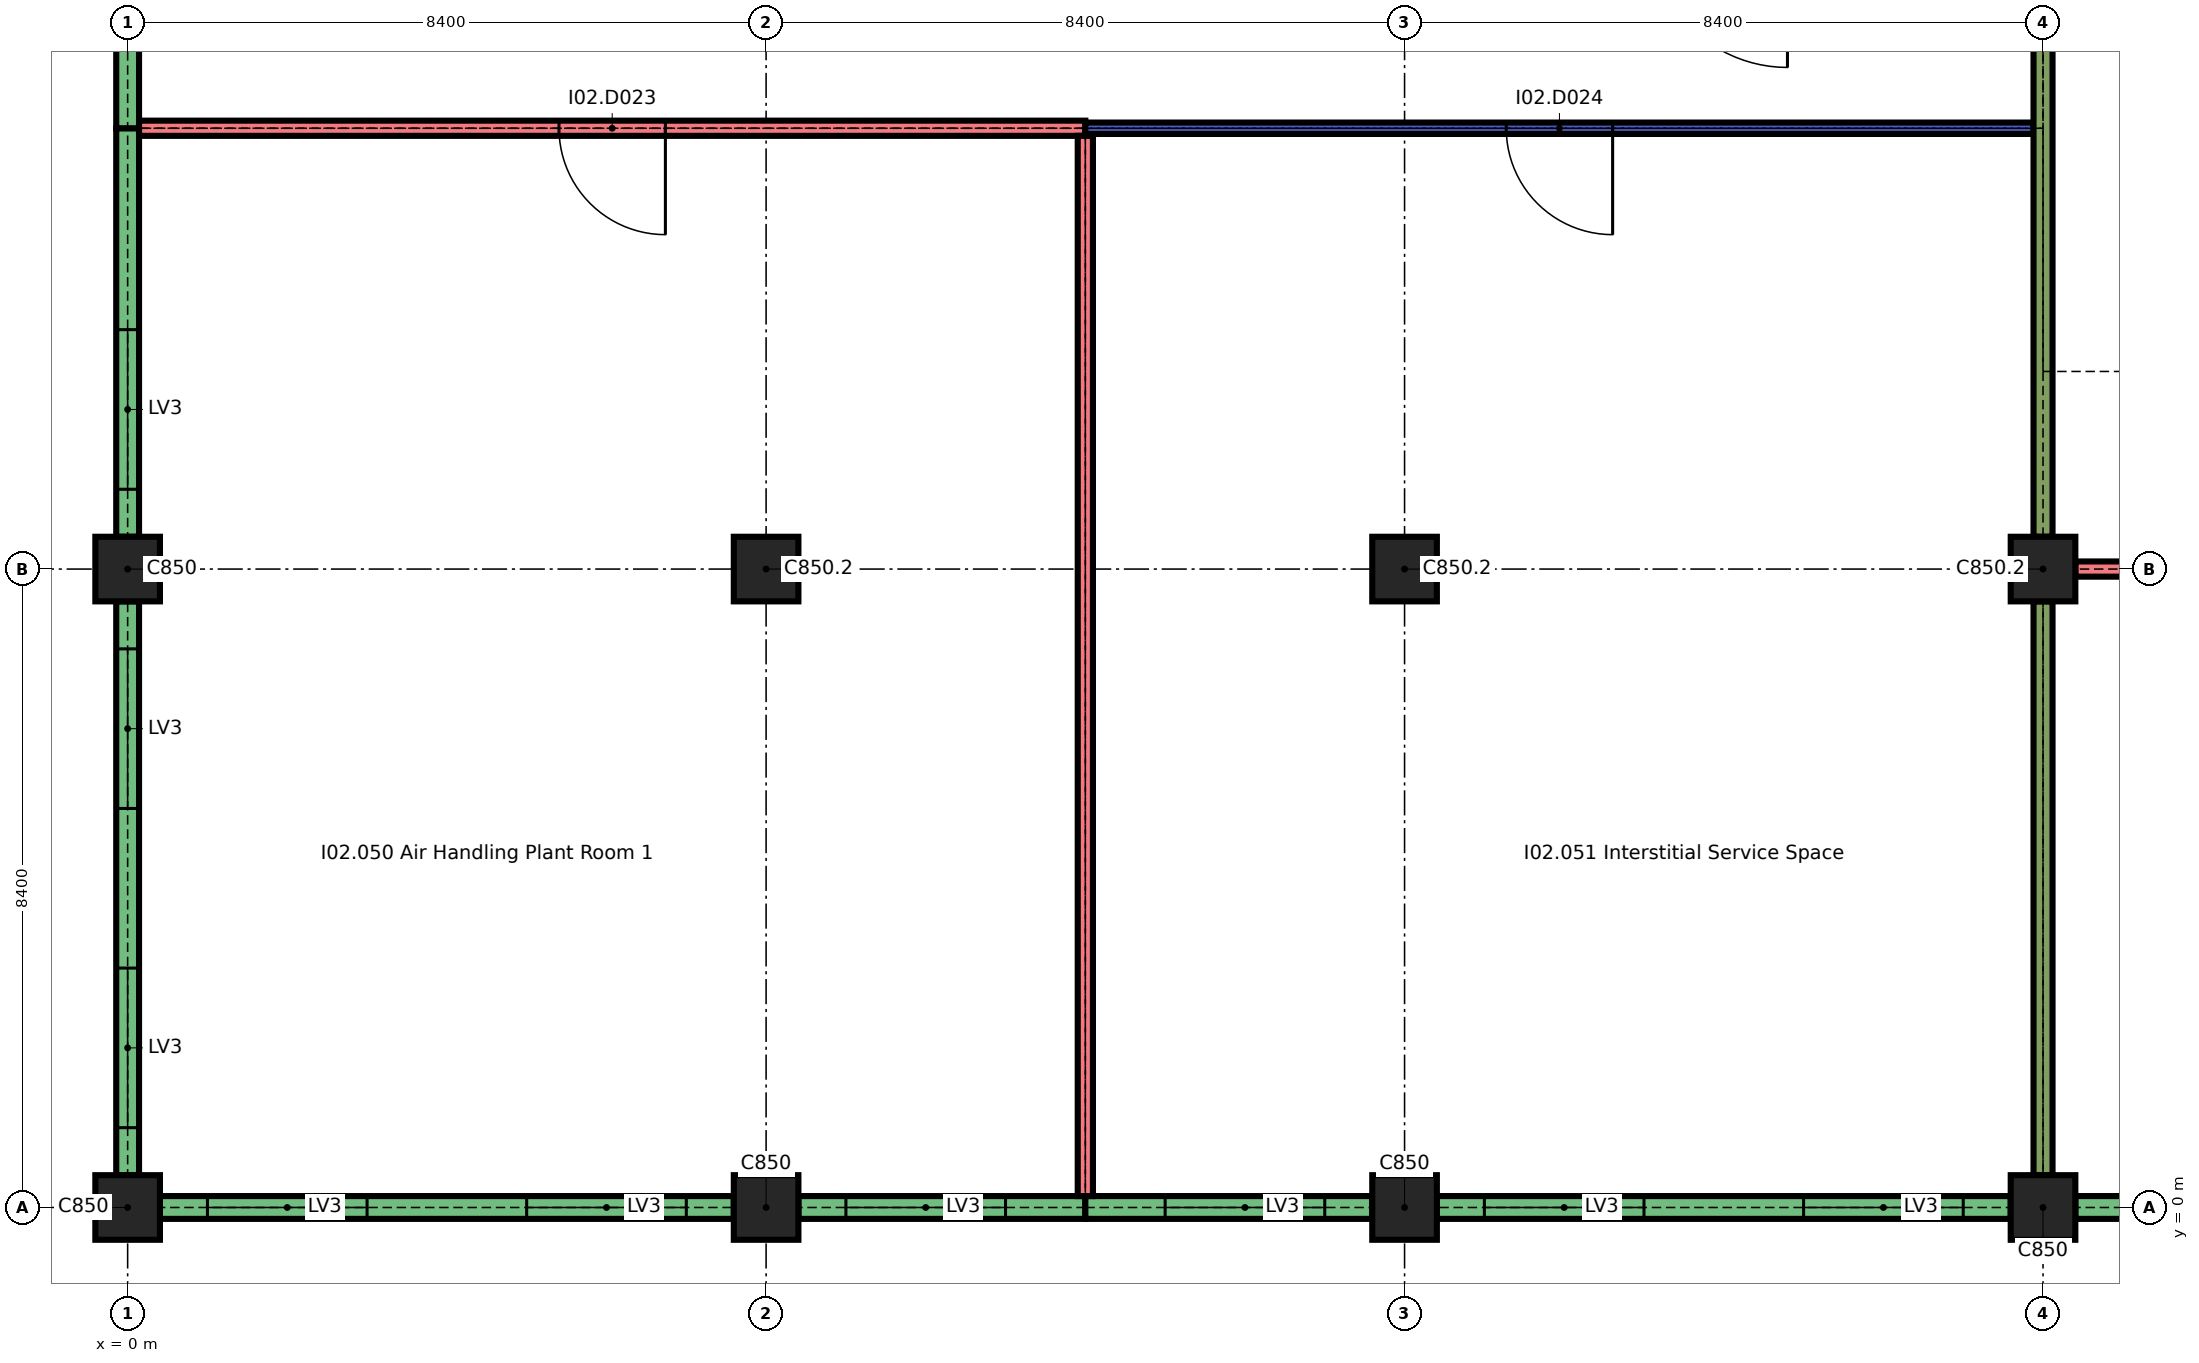
"""IFC4 building model, lengths in metres.
Left out: names, types, materials, properties, quantities, classifications, styles, units other than length and angle.
Written with IfcOpenShell. Run it as: python <this file> out.ifc"""

import sys

from ifc_helpers import new_model, si_unit, direction, frame, frame_2d, origin, origin_2d, place, context, subcontext, project, spatial, rectangle, extrude, element, fill, save


model = new_model("IFC4")
c1 = context("Model", 3, precision=1e-05, world=origin(), true_north=direction((0.0, 1.0)))
c2 = subcontext(c1, "Body", "Model", "MODEL_VIEW")
j1 = project(units=[si_unit("LENGTHUNIT", "METRE"), si_unit("PLANEANGLEUNIT", "RADIAN")], contexts=[c1])
p1 = place(None, origin())
s1 = spatial("IfcSite", under=j1, at=p1, CompositionType="ELEMENT")
p2 = place(p1, origin())
s2 = spatial("IfcBuilding", under=s1, at=p2, CompositionType="ELEMENT")
p3 = place(p2, frame((0.0, 0.0, 12.9)))
s3 = spatial("IfcBuildingStorey", under=s2, at=p3, CompositionType="ELEMENT", Elevation=12.9)
for number, where, z_axis, x_axis in (
    (1, (0.0, 0.0, 0.0), (0.0, 0.0, 1.0), (1.0, 0.0, 0.0)),
    (2, (8.4, 0.0, 0.0), (0.0, 0.0, 1.0), (1.0, 0.0, 0.0)),
    (3, (16.8, 0.0, 0.0), (0.0, 0.0, 1.0), (1.0, 0.0, 0.0)),
    (4, (25.2, 0.0, 0.0), (0.0, 0.0, 1.0), (1.0, 0.0, 0.0)),
    (5, (0.0, 8.4, 0.0), (0.0, 0.0, 1.0), (1.0, 0.0, 0.0)),
    (6, (8.4, 8.4, 0.0), (0.0, 0.0, 1.0), (1.0, 0.0, 0.0)),
    (7, (16.8, 8.4, 0.0), (0.0, 0.0, 1.0), (1.0, 0.0, 0.0)),
    (8, (25.2, 8.4, 0.0), (0.0, 0.0, 1.0), (1.0, 0.0, 0.0)),
):
    element("IfcColumn", number, at=place(p3, frame(where, z_axis=z_axis, x_axis=x_axis)), inside=s3, PredefinedType="COLUMN", context=c2, shape_type="SweptSolid", body=[
        extrude(rectangle(XDim=0.85, YDim=0.85, at=origin_2d()), origin(), (0.0, 0.0, 1.0), 2.04),
    ])
p4 = place(p3, frame((0.425, 0.0, 0.0), z_axis=(0.0, 0.0, 1.0), x_axis=(1.0, 0.0, 0.0)))
e9 = element("IfcWall", 9, at=p4, inside=s3, PredefinedType="SOLIDWALL", context=c2, shape_type="SweptSolid", body=[
    extrude(rectangle(XDim=7.55, YDim=0.3, at=frame_2d((3.775, 0.0))), origin(), (0.0, 0.0, 1.0), 1.74),
])
p5 = place(p4, frame((0.625, 0.0, 0.6)))
e10 = element("IfcOpeningElement", 10, at=p5, cuts=e9, PredefinedType="OPENING", context=c2, shape_type="SweptSolid", body=[
    extrude(rectangle(XDim=2.1, YDim=1.05, at=frame_2d((1.05, 0.525))), frame((0.0, 0.16, 0.0), z_axis=(0.0, -1.0, 0.0), x_axis=(1.0, 0.0, 0.0)), (0.0, 0.0, 1.0), 0.32),
])
p6 = place(p4, frame((4.825, 0.0, 0.6)))
e11 = element("IfcOpeningElement", 11, at=p6, cuts=e9, PredefinedType="OPENING", context=c2, shape_type="SweptSolid", body=[
    extrude(rectangle(XDim=2.1, YDim=1.05, at=frame_2d((1.05, 0.525))), frame((0.0, 0.16, 0.0), z_axis=(0.0, -1.0, 0.0), x_axis=(1.0, 0.0, 0.0)), (0.0, 0.0, 1.0), 0.32),
])
p7 = place(p3, frame((8.825, 0.0, 0.0), z_axis=(0.0, 0.0, 1.0), x_axis=(1.0, 0.0, 0.0)))
e12 = element("IfcWall", 12, at=p7, inside=s3, PredefinedType="SOLIDWALL", context=c2, shape_type="SweptSolid", body=[
    extrude(rectangle(XDim=3.775, YDim=0.3, at=frame_2d((1.888, 0.0))), origin(), (0.0, 0.0, 1.0), 1.74),
])
p8 = place(p7, frame((0.625, 0.0, 0.6)))
e13 = element("IfcOpeningElement", 13, at=p8, cuts=e12, PredefinedType="OPENING", context=c2, shape_type="SweptSolid", body=[
    extrude(rectangle(XDim=2.1, YDim=1.05, at=frame_2d((1.05, 0.525))), frame((0.0, 0.16, 0.0), z_axis=(0.0, -1.0, 0.0), x_axis=(1.0, 0.0, 0.0)), (0.0, 0.0, 1.0), 0.32),
])
p9 = place(p3, frame((12.6, 0.0, 0.0), z_axis=(0.0, 0.0, 1.0), x_axis=(1.0, 0.0, 0.0)))
e14 = element("IfcWall", 14, at=p9, inside=s3, PredefinedType="SOLIDWALL", context=c2, shape_type="SweptSolid", body=[
    extrude(rectangle(XDim=3.775, YDim=0.3, at=frame_2d((1.887, 0.0))), origin(), (0.0, 0.0, 1.0), 1.74),
])
p10 = place(p9, frame((1.05, 0.0, 0.6)))
e15 = element("IfcOpeningElement", 15, at=p10, cuts=e14, PredefinedType="OPENING", context=c2, shape_type="SweptSolid", body=[
    extrude(rectangle(XDim=2.1, YDim=1.05, at=frame_2d((1.05, 0.525))), frame((0.0, 0.16, 0.0), z_axis=(0.0, -1.0, 0.0), x_axis=(1.0, 0.0, 0.0)), (0.0, 0.0, 1.0), 0.32),
])
p11 = place(p3, frame((17.225, 0.0, 0.0), z_axis=(0.0, 0.0, 1.0), x_axis=(1.0, 0.0, 0.0)))
e16 = element("IfcWall", 16, at=p11, inside=s3, PredefinedType="SOLIDWALL", context=c2, shape_type="SweptSolid", body=[
    extrude(rectangle(XDim=7.55, YDim=0.3, at=frame_2d((3.775, 0.0))), origin(), (0.0, 0.0, 1.0), 1.74),
])
p12 = place(p11, frame((0.625, 0.0, 0.6)))
e17 = element("IfcOpeningElement", 17, at=p12, cuts=e16, PredefinedType="OPENING", context=c2, shape_type="SweptSolid", body=[
    extrude(rectangle(XDim=2.1, YDim=1.05, at=frame_2d((1.05, 0.525))), frame((0.0, 0.16, 0.0), z_axis=(0.0, -1.0, 0.0), x_axis=(1.0, 0.0, 0.0)), (0.0, 0.0, 1.0), 0.32),
])
p13 = place(p11, frame((4.825, 0.0, 0.6)))
e18 = element("IfcOpeningElement", 18, at=p13, cuts=e16, PredefinedType="OPENING", context=c2, shape_type="SweptSolid", body=[
    extrude(rectangle(XDim=2.1, YDim=1.05, at=frame_2d((1.05, 0.525))), frame((0.0, 0.16, 0.0), z_axis=(0.0, -1.0, 0.0), x_axis=(1.0, 0.0, 0.0)), (0.0, 0.0, 1.0), 0.32),
])
p14 = place(p3, frame((25.625, 0.0, 0.0), z_axis=(0.0, 0.0, 1.0), x_axis=(1.0, 0.0, 0.0)))
e19 = element("IfcWall", 19, at=p14, inside=s3, PredefinedType="SOLIDWALL", context=c2, shape_type="SweptSolid", body=[
    extrude(rectangle(XDim=7.975, YDim=0.3, at=frame_2d((3.988, 0.0))), origin(), (0.0, 0.0, 1.0), 1.74),
])
p15 = place(p14, frame((0.625, 0.0, 0.6)))
e20 = element("IfcOpeningElement", 20, at=p15, cuts=e19, PredefinedType="OPENING", context=c2, shape_type="SweptSolid", body=[
    extrude(rectangle(XDim=2.1, YDim=1.05, at=frame_2d((1.05, 0.525))), frame((0.0, 0.16, 0.0), z_axis=(0.0, -1.0, 0.0), x_axis=(1.0, 0.0, 0.0)), (0.0, 0.0, 1.0), 0.32),
])
p16 = place(p14, frame((4.825, 0.0, 0.6)))
e21 = element("IfcOpeningElement", 21, at=p16, cuts=e19, PredefinedType="OPENING", context=c2, shape_type="SweptSolid", body=[
    extrude(rectangle(XDim=2.1, YDim=1.05, at=frame_2d((1.05, 0.525))), frame((0.0, 0.16, 0.0), z_axis=(0.0, -1.0, 0.0), x_axis=(1.0, 0.0, 0.0)), (0.0, 0.0, 1.0), 0.32),
])
p17 = place(p3, frame((0.0, 0.425, 0.0), z_axis=(0.0, 0.0, 1.0), x_axis=(0.0, 1.0, 0.0)))
e22 = element("IfcWall", 22, at=p17, inside=s3, PredefinedType="SOLIDWALL", context=c2, shape_type="SweptSolid", body=[
    extrude(rectangle(XDim=7.55, YDim=0.3, at=frame_2d((3.775, 0.0))), origin(), (0.0, 0.0, 1.0), 1.74),
])
p18 = place(p17, frame((0.625, 0.0, 0.6)))
e23 = element("IfcOpeningElement", 23, at=p18, cuts=e22, PredefinedType="OPENING", context=c2, shape_type="SweptSolid", body=[
    extrude(rectangle(XDim=2.1, YDim=1.05, at=frame_2d((1.05, 0.525))), frame((0.0, 0.16, 0.0), z_axis=(0.0, -1.0, 0.0), x_axis=(1.0, 0.0, 0.0)), (0.0, 0.0, 1.0), 0.32),
])
p19 = place(p17, frame((4.825, 0.0, 0.6)))
e24 = element("IfcOpeningElement", 24, at=p19, cuts=e22, PredefinedType="OPENING", context=c2, shape_type="SweptSolid", body=[
    extrude(rectangle(XDim=2.1, YDim=1.05, at=frame_2d((1.05, 0.525))), frame((0.0, 0.16, 0.0), z_axis=(0.0, -1.0, 0.0), x_axis=(1.0, 0.0, 0.0)), (0.0, 0.0, 1.0), 0.32),
])
p20 = place(p3, frame((0.0, 8.825, 0.0), z_axis=(0.0, 0.0, 1.0), x_axis=(0.0, 1.0, 0.0)))
e25 = element("IfcWall", 25, at=p20, inside=s3, PredefinedType="SOLIDWALL", context=c2, shape_type="SweptSolid", body=[
    extrude(rectangle(XDim=5.375, YDim=0.3, at=frame_2d((2.688, 0.0))), origin(), (0.0, 0.0, 1.0), 1.74),
])
p21 = place(p20, frame((0.625, 0.0, 0.6)))
e26 = element("IfcOpeningElement", 26, at=p21, cuts=e25, PredefinedType="OPENING", context=c2, shape_type="SweptSolid", body=[
    extrude(rectangle(XDim=2.1, YDim=1.05, at=frame_2d((1.05, 0.525))), frame((0.0, 0.16, 0.0), z_axis=(0.0, -1.0, 0.0), x_axis=(1.0, 0.0, 0.0)), (0.0, 0.0, 1.0), 0.32),
])
p22 = place(p3, frame((0.0, 14.2, 0.0), z_axis=(0.0, 0.0, 1.0), x_axis=(0.0, 1.0, 0.0)))
e27 = element("IfcWall", 27, at=p22, inside=s3, PredefinedType="SOLIDWALL", context=c2, shape_type="SweptSolid", body=[
    extrude(rectangle(XDim=2.6, YDim=0.3, at=frame_2d((1.3, 0.0))), origin(), (0.0, 0.0, 1.0), 1.74),
])
p23 = place(p3, frame((25.625, 8.4, 0.0), z_axis=(0.0, 0.0, 1.0), x_axis=(1.0, 0.0, 0.0)))
e28 = element("IfcWall", 28, at=p23, inside=s3, PredefinedType="SOLIDWALL", context=c2, shape_type="SweptSolid", body=[
    extrude(rectangle(XDim=7.975, YDim=0.2, at=frame_2d((3.988, 0.0))), origin(), (0.0, 0.0, 1.0), 2.04),
])
p24 = place(p23, frame((3.288, 0.0, 0.0)))
e29 = element("IfcOpeningElement", 29, at=p24, cuts=e28, PredefinedType="OPENING", context=c2, shape_type="SweptSolid", body=[
    extrude(rectangle(XDim=1.4, YDim=2.0, at=frame_2d((0.7, 1.0))), frame((0.0, 0.11, 0.0), z_axis=(0.0, -1.0, 0.0), x_axis=(1.0, 0.0, 0.0)), (0.0, 0.0, 1.0), 0.22),
])
p25 = place(p3, frame((0.15, 14.2, 0.0), z_axis=(0.0, 0.0, 1.0), x_axis=(1.0, 0.0, 0.0)))
e30 = element("IfcWall", 30, at=p25, inside=s3, PredefinedType="SOLIDWALL", context=c2, shape_type="SweptSolid", body=[
    extrude(rectangle(XDim=12.45, YDim=0.2, at=frame_2d((6.225, 0.0))), origin(), (0.0, 0.0, 1.0), 2.04),
])
p26 = place(p25, frame((5.525, 0.0, 0.0)))
e31 = element("IfcOpeningElement", 31, at=p26, cuts=e30, PredefinedType="OPENING", context=c2, shape_type="SweptSolid", body=[
    extrude(rectangle(XDim=1.4, YDim=2.0, at=frame_2d((0.7, 1.0))), frame((0.0, 0.11, 0.0), z_axis=(0.0, -1.0, 0.0), x_axis=(1.0, 0.0, 0.0)), (0.0, 0.0, 1.0), 0.22),
])
p27 = place(p3, frame((12.6, 14.2, 0.0), z_axis=(0.0, 0.0, 1.0), x_axis=(1.0, 0.0, 0.0)))
e32 = element("IfcWall", 32, at=p27, inside=s3, PredefinedType="PARTITIONING", context=c2, shape_type="SweptSolid", body=[
    extrude(rectangle(XDim=12.475, YDim=0.15, at=frame_2d((6.237, 0.0))), origin(), (0.0, 0.0, 1.0), 2.04),
])
p28 = place(p27, frame((5.538, 0.0, 0.0)))
e33 = element("IfcOpeningElement", 33, at=p28, cuts=e32, PredefinedType="OPENING", context=c2, shape_type="SweptSolid", body=[
    extrude(rectangle(XDim=1.4, YDim=2.0, at=frame_2d((0.7, 1.0))), frame((0.0, 0.085, 0.0), z_axis=(0.0, -1.0, 0.0), x_axis=(1.0, 0.0, 0.0)), (0.0, 0.0, 1.0), 0.17),
])
p29 = place(p3, frame((12.6, 0.15, 0.0), z_axis=(0.0, 0.0, 1.0), x_axis=(0.0, 1.0, 0.0)))
e34 = element("IfcWall", 34, at=p29, inside=s3, PredefinedType="SOLIDWALL", context=c2, shape_type="SweptSolid", body=[
    extrude(rectangle(XDim=13.95, YDim=0.2, at=frame_2d((6.975, 0.0))), origin(), (0.0, 0.0, 1.0), 2.04),
])
p30 = place(p3, frame((25.2, 0.425, 0.0), z_axis=(0.0, 0.0, 1.0), x_axis=(0.0, 1.0, 0.0)))
e35 = element("IfcWall", 35, at=p30, inside=s3, PredefinedType="SOLIDWALL", context=c2, shape_type="SweptSolid", body=[
    extrude(rectangle(XDim=7.55, YDim=0.25, at=frame_2d((3.775, 0.0))), origin(), (0.0, 0.0, 1.0), 2.04),
])
p31 = place(p3, frame((25.2, 8.825, 0.0), z_axis=(0.0, 0.0, 1.0), x_axis=(0.0, 1.0, 0.0)))
e36 = element("IfcWall", 36, at=p31, inside=s3, PredefinedType="SOLIDWALL", context=c2, shape_type="SweptSolid", body=[
    extrude(rectangle(XDim=12.775, YDim=0.25, at=frame_2d((6.388, 0.0))), origin(), (0.0, 0.0, 1.0), 2.04),
])
p32 = place(p31, frame((9.475, 0.0, 0.0)))
e37 = element("IfcOpeningElement", 37, at=p32, cuts=e36, PredefinedType="OPENING", context=c2, shape_type="SweptSolid", body=[
    extrude(rectangle(XDim=1.8, YDim=2.0, at=frame_2d((0.9, 1.0))), frame((0.0, 0.135, 0.0), z_axis=(0.0, -1.0, 0.0), x_axis=(1.0, 0.0, 0.0)), (0.0, 0.0, 1.0), 0.27),
])
p33 = place(p5, origin())
e38 = element("IfcWindow", 38, at=p33, inside=s3, PartitioningType="SINGLE_PANEL", PredefinedType="WINDOW", context=c2, shape_type="SweptSolid", body=[
    extrude(rectangle(XDim=2.1, YDim=1.05, at=frame_2d((1.05, 0.525))), frame((0.0, 0.075, 0.0), z_axis=(0.0, -1.0, 0.0), x_axis=(1.0, 0.0, 0.0)), (0.0, 0.0, 1.0), 0.15),
])
fill(e10, e38)
p34 = place(p6, origin())
e39 = element("IfcWindow", 39, at=p34, inside=s3, PartitioningType="SINGLE_PANEL", PredefinedType="WINDOW", context=c2, shape_type="SweptSolid", body=[
    extrude(rectangle(XDim=2.1, YDim=1.05, at=frame_2d((1.05, 0.525))), frame((0.0, 0.075, 0.0), z_axis=(0.0, -1.0, 0.0), x_axis=(1.0, 0.0, 0.0)), (0.0, 0.0, 1.0), 0.15),
])
fill(e11, e39)
p35 = place(p8, origin())
e40 = element("IfcWindow", 40, at=p35, inside=s3, PartitioningType="SINGLE_PANEL", PredefinedType="WINDOW", context=c2, shape_type="SweptSolid", body=[
    extrude(rectangle(XDim=2.1, YDim=1.05, at=frame_2d((1.05, 0.525))), frame((0.0, 0.075, 0.0), z_axis=(0.0, -1.0, 0.0), x_axis=(1.0, 0.0, 0.0)), (0.0, 0.0, 1.0), 0.15),
])
fill(e13, e40)
p36 = place(p10, origin())
e41 = element("IfcWindow", 41, at=p36, inside=s3, PartitioningType="SINGLE_PANEL", PredefinedType="WINDOW", context=c2, shape_type="SweptSolid", body=[
    extrude(rectangle(XDim=2.1, YDim=1.05, at=frame_2d((1.05, 0.525))), frame((0.0, 0.075, 0.0), z_axis=(0.0, -1.0, 0.0), x_axis=(1.0, 0.0, 0.0)), (0.0, 0.0, 1.0), 0.15),
])
fill(e15, e41)
p37 = place(p12, origin())
e42 = element("IfcWindow", 42, at=p37, inside=s3, PartitioningType="SINGLE_PANEL", PredefinedType="WINDOW", context=c2, shape_type="SweptSolid", body=[
    extrude(rectangle(XDim=2.1, YDim=1.05, at=frame_2d((1.05, 0.525))), frame((0.0, 0.075, 0.0), z_axis=(0.0, -1.0, 0.0), x_axis=(1.0, 0.0, 0.0)), (0.0, 0.0, 1.0), 0.15),
])
fill(e17, e42)
p38 = place(p13, origin())
e43 = element("IfcWindow", 43, at=p38, inside=s3, PartitioningType="SINGLE_PANEL", PredefinedType="WINDOW", context=c2, shape_type="SweptSolid", body=[
    extrude(rectangle(XDim=2.1, YDim=1.05, at=frame_2d((1.05, 0.525))), frame((0.0, 0.075, 0.0), z_axis=(0.0, -1.0, 0.0), x_axis=(1.0, 0.0, 0.0)), (0.0, 0.0, 1.0), 0.15),
])
fill(e18, e43)
p39 = place(p18, origin())
e44 = element("IfcWindow", 44, at=p39, inside=s3, PartitioningType="SINGLE_PANEL", PredefinedType="WINDOW", context=c2, shape_type="SweptSolid", body=[
    extrude(rectangle(XDim=2.1, YDim=1.05, at=frame_2d((1.05, 0.525))), frame((0.0, 0.075, 0.0), z_axis=(0.0, -1.0, 0.0), x_axis=(1.0, 0.0, 0.0)), (0.0, 0.0, 1.0), 0.15),
])
fill(e23, e44)
p40 = place(p19, origin())
e45 = element("IfcWindow", 45, at=p40, inside=s3, PartitioningType="SINGLE_PANEL", PredefinedType="WINDOW", context=c2, shape_type="SweptSolid", body=[
    extrude(rectangle(XDim=2.1, YDim=1.05, at=frame_2d((1.05, 0.525))), frame((0.0, 0.075, 0.0), z_axis=(0.0, -1.0, 0.0), x_axis=(1.0, 0.0, 0.0)), (0.0, 0.0, 1.0), 0.15),
])
fill(e24, e45)
p41 = place(p21, origin())
e46 = element("IfcWindow", 46, at=p41, inside=s3, PartitioningType="SINGLE_PANEL", PredefinedType="WINDOW", context=c2, shape_type="SweptSolid", body=[
    extrude(rectangle(XDim=2.1, YDim=1.05, at=frame_2d((1.05, 0.525))), frame((0.0, 0.075, 0.0), z_axis=(0.0, -1.0, 0.0), x_axis=(1.0, 0.0, 0.0)), (0.0, 0.0, 1.0), 0.15),
])
fill(e26, e46)
p42 = place(p26, origin())
e47 = element("IfcDoor", 47, at=p42, inside=s3, OperationType="SINGLE_SWING_RIGHT", PredefinedType="DOOR", context=c2, shape_type="SweptSolid", body=[
    extrude(rectangle(XDim=1.4, YDim=2.0, at=frame_2d((0.7, 1.0))), frame((0.0, 0.025, 0.0), z_axis=(0.0, -1.0, 0.0), x_axis=(1.0, 0.0, 0.0)), (0.0, 0.0, 1.0), 0.05),
])
fill(e31, e47)
p43 = place(p28, origin())
e48 = element("IfcDoor", 48, at=p43, inside=s3, OperationType="SINGLE_SWING_RIGHT", PredefinedType="DOOR", context=c2, shape_type="SweptSolid", body=[
    extrude(rectangle(XDim=1.4, YDim=2.0, at=frame_2d((0.7, 1.0))), frame((0.0, 0.025, 0.0), z_axis=(0.0, -1.0, 0.0), x_axis=(1.0, 0.0, 0.0)), (0.0, 0.0, 1.0), 0.05),
])
fill(e33, e48)
save(model, sys.argv[1])
